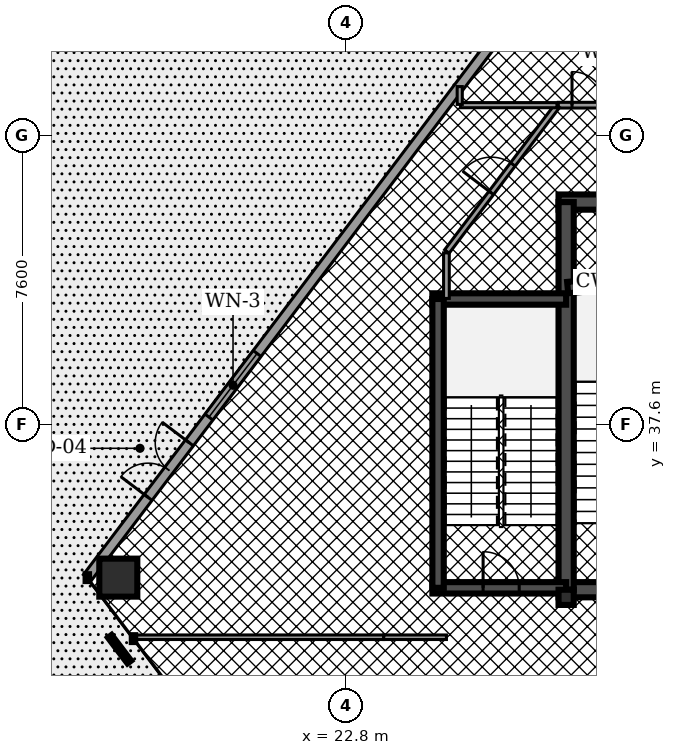
"""IFC4 building model, lengths in metres.
Left out: names, types, materials, properties, quantities, classifications, styles, units other than length and angle.
Written with IfcOpenShell. Run it as: python <this file> out.ifc"""

import sys

from ifc_helpers import new_model, si_unit, direction, frame, frame_2d, origin, origin_2d, place, context, subcontext, project, spatial, rectangle, hollow_rectangle, extrude, element, fill, save


model = new_model("IFC4")
c1 = context("Model", 3, precision=1e-05, world=origin(), true_north=direction((0.0, 1.0)))
c2 = subcontext(c1, "Body", "Model", "MODEL_VIEW")
j1 = project(units=[si_unit("LENGTHUNIT", "METRE"), si_unit("PLANEANGLEUNIT", "RADIAN")], contexts=[c1])
p1 = place(None, origin())
s1 = spatial("IfcSite", under=j1, at=p1, CompositionType="ELEMENT")
p2 = place(p1, origin())
s2 = spatial("IfcBuilding", under=s1, at=p2, CompositionType="ELEMENT")
p3 = place(p2, frame((0.0, 0.0, 22.78)))
s3 = spatial("IfcBuildingStorey", under=s2, at=p3, CompositionType="ELEMENT", Elevation=22.78)
p4 = place(p3, frame((28.4, 43.45, 0.0), z_axis=(0.0, 0.0, 1.0), x_axis=(1.0, 0.0, 0.0)))
e1 = element("IfcWall", 1, at=p4, inside=s3, PredefinedType="SHEAR", context=c2, shape_type="SweptSolid", body=[
    extrude(rectangle(XDim=20.06, YDim=0.4, at=frame_2d((10.03, 0.0))), origin(), (0.0, 0.0, 1.0), 4.5),
])
p5 = place(p3, frame((28.4, 33.25, 0.0), z_axis=(0.0, 0.0, 1.0), x_axis=(1.0, 0.0, 0.0)))
e2 = element("IfcWall", 2, at=p5, inside=s3, PredefinedType="SHEAR", context=c2, shape_type="SweptSolid", body=[
    extrude(rectangle(XDim=20.06, YDim=0.4, at=frame_2d((10.03, 0.0))), origin(), (0.0, 0.0, 1.0), 4.5),
])
p6 = place(p5, frame((4.03, 0.0, 0.0)))
e3 = element("IfcOpeningElement", 3, at=p6, cuts=e2, PredefinedType="OPENING", context=c2, shape_type="SweptSolid", body=[
    extrude(rectangle(XDim=1.1, YDim=2.15, at=frame_2d((0.55, 1.075))), frame((0.0, 0.21, 0.0), z_axis=(0.0, -1.0, 0.0), x_axis=(1.0, 0.0, 0.0)), (0.0, 0.0, 1.0), 0.42),
])
p7 = place(p5, frame((14.87, 0.0, 0.0)))
e4 = element("IfcOpeningElement", 4, at=p7, cuts=e2, PredefinedType="OPENING", context=c2, shape_type="SweptSolid", body=[
    extrude(rectangle(XDim=1.1, YDim=2.15, at=frame_2d((0.55, 1.075))), frame((0.0, 0.21, 0.0), z_axis=(0.0, -1.0, 0.0), x_axis=(1.0, 0.0, 0.0)), (0.0, 0.0, 1.0), 0.42),
])
p8 = place(p5, frame((1.31, 0.0, 0.0)))
e5 = element("IfcOpeningElement", 5, at=p8, cuts=e2, PredefinedType="OPENING", context=c2, shape_type="SweptSolid", body=[
    extrude(rectangle(XDim=1.1, YDim=2.2, at=frame_2d((0.55, 1.1))), frame((0.0, 0.21, 0.0), z_axis=(0.0, -1.0, 0.0), x_axis=(1.0, 0.0, 0.0)), (0.0, 0.0, 1.0), 0.42),
])
p9 = place(p5, frame((9.44, 0.0, 0.0)))
e6 = element("IfcOpeningElement", 6, at=p9, cuts=e2, PredefinedType="OPENING", context=c2, shape_type="SweptSolid", body=[
    extrude(rectangle(XDim=1.12, YDim=2.05, at=frame_2d((0.56, 1.025))), frame((0.0, 0.21, 0.0), z_axis=(0.0, -1.0, 0.0), x_axis=(1.0, 0.0, 0.0)), (0.0, 0.0, 1.0), 0.42),
])
p10 = place(p5, frame((17.65, 0.0, 0.0)))
e7 = element("IfcOpeningElement", 7, at=p10, cuts=e2, PredefinedType="OPENING", context=c2, shape_type="SweptSolid", body=[
    extrude(rectangle(XDim=1.1, YDim=2.2, at=frame_2d((0.55, 1.1))), frame((0.0, 0.21, 0.0), z_axis=(0.0, -1.0, 0.0), x_axis=(1.0, 0.0, 0.0)), (0.0, 0.0, 1.0), 0.42),
])
p11 = place(p3, frame((28.6, 33.25, 0.0), z_axis=(0.0, 0.0, 1.0), x_axis=(0.0, 1.0, 0.0)))
e8 = element("IfcWall", 8, at=p11, inside=s3, PredefinedType="SHEAR", context=c2, shape_type="SweptSolid", body=[
    extrude(rectangle(XDim=10.2, YDim=0.4, at=frame_2d((5.1, 0.0))), origin(), (0.0, 0.0, 1.0), 4.5),
])
p12 = place(p3, frame((28.64, 41.2, 0.0), z_axis=(0.0, 0.0, 1.0), x_axis=(0.995687118776, 0.092774789157, 0.0)))
e9 = element("IfcWall", 9, at=p12, inside=s3, PredefinedType="SHEAR", context=c2, shape_type="SweptSolid", body=[
    extrude(rectangle(XDim=3.234, YDim=0.3, at=frame_2d((1.617, 0.0))), origin(), (0.0, 0.0, 1.0), 4.5),
])
p13 = place(p3, frame((25.08, 40.9, 0.0), z_axis=(0.0, 0.0, 1.0), x_axis=(1.0, 0.0, 0.0)))
e10 = element("IfcWall", 10, at=p13, inside=s3, PredefinedType="SHEAR", context=c2, shape_type="SweptSolid", body=[
    extrude(rectangle(XDim=3.52, YDim=0.3, at=frame_2d((1.76, 0.0))), origin(), (0.0, 0.0, 1.0), 4.5),
])
p14 = place(p3, frame((25.08, 33.3, 0.0), z_axis=(0.0, 0.0, 1.0), x_axis=(1.0, 0.0, 0.0)))
e11 = element("IfcWall", 11, at=p14, inside=s3, PredefinedType="SHEAR", context=c2, shape_type="SweptSolid", body=[
    extrude(rectangle(XDim=3.52, YDim=0.3, at=frame_2d((1.76, 0.0))), origin(), (0.0, 0.0, 1.0), 4.5),
])
p15 = place(p14, frame((1.335, 0.0, 0.0)))
e12 = element("IfcOpeningElement", 12, at=p15, cuts=e11, PredefinedType="OPENING", context=c2, shape_type="SweptSolid", body=[
    extrude(rectangle(XDim=0.95, YDim=2.2, at=frame_2d((0.475, 1.1))), frame((0.0, 0.16, 0.0), z_axis=(0.0, -1.0, 0.0), x_axis=(1.0, 0.0, 0.0)), (0.0, 0.0, 1.0), 0.32),
])
p16 = place(p3, frame((25.23, 33.3, 0.0), z_axis=(0.0, 0.0, 1.0), x_axis=(0.0, 1.0, 0.0)))
e13 = element("IfcWall", 13, at=p16, inside=s3, PredefinedType="SHEAR", context=c2, shape_type="SweptSolid", body=[
    extrude(rectangle(XDim=7.6, YDim=0.3, at=frame_2d((3.8, 0.0))), origin(), (0.0, 0.0, 1.0), 4.5),
])
p17 = place(p3, frame((16.815, 33.568, 0.0), z_axis=(-0.010463457078, 0.03626970355, 0.999287258335), x_axis=(-0.960816235785, -0.277186148739, 0.0)))
e14 = element("IfcColumn", 14, at=p17, inside=s3, PredefinedType="COLUMN", context=c2, shape_type="SweptSolid", body=[
    extrude(hollow_rectangle(XDim=1.0, YDim=1.0, WallThickness=0.05, at=origin_2d()), origin(), (0.0, 0.0, 1.0), 4.503),
])
p18 = place(p3, frame((28.6, 33.05, 0.0), z_axis=(0.0, 0.0, 1.0), x_axis=(1.0, 0.0, 0.0)))
e15 = element("IfcColumn", 15, at=p18, inside=s3, PredefinedType="PILASTER", context=c2, shape_type="SweptSolid", body=[
    extrude(hollow_rectangle(XDim=0.4, YDim=0.4, WallThickness=0.02, at=origin_2d()), origin(), (0.0, 0.0, 1.0), 4.5),
])
p19 = place(p3, frame((16.0, 33.568, 0.0), z_axis=(0.0, 0.0, 1.0), x_axis=(0.603864446157, 0.797087028289, 0.0)))
e16 = element("IfcWall", 16, at=p19, inside=s3, PredefinedType="STANDARD", context=c2, shape_type="SweptSolid", body=[
    extrude(rectangle(XDim=20.866, YDim=0.26, at=frame_2d((10.433, 0.0))), origin(), (0.0, 0.0, 1.0), 3.65),
])
p20 = place(p19, frame((2.65, 0.0, 0.0)))
e17 = element("IfcOpeningElement", 17, at=p20, cuts=e16, PredefinedType="OPENING", context=c2, shape_type="SweptSolid", body=[
    extrude(rectangle(XDim=1.8, YDim=2.2, at=frame_2d((0.9, 1.1))), frame((0.0, 0.14, 0.0), z_axis=(0.0, -1.0, 0.0), x_axis=(1.0, 0.0, 0.0)), (0.0, 0.0, 1.0), 0.28),
])
p21 = place(p19, frame((5.3, 0.0, 0.75)))
e18 = element("IfcOpeningElement", 18, at=p21, cuts=e16, PredefinedType="OPENING", context=c2, shape_type="SweptSolid", body=[
    extrude(rectangle(XDim=2.1, YDim=2.2, at=frame_2d((1.05, 1.1))), frame((0.0, 0.14, 0.0), z_axis=(0.0, -1.0, 0.0), x_axis=(1.0, 0.0, 0.0)), (0.0, 0.0, 1.0), 0.28),
])
p22 = place(p3, frame((28.394, 46.0, 0.0), z_axis=(0.0, 0.0, 1.0), x_axis=(1.0, 0.0, 0.0)))
e19 = element("IfcWall", 19, at=p22, inside=s3, PredefinedType="PARTITIONING", context=c2, shape_type="SweptSolid", body=[
    extrude(rectangle(XDim=1.601, YDim=0.15, at=frame_2d((0.801, 0.0))), origin(), (0.0, 0.0, 1.0), 3.457),
])
p23 = place(p22, frame((0.361, 0.0, 0.0)))
e20 = element("IfcOpeningElement", 20, at=p23, cuts=e19, PredefinedType="OPENING", context=c2, shape_type="SweptSolid", body=[
    extrude(rectangle(XDim=0.88, YDim=2.05, at=frame_2d((0.44, 1.025))), frame((0.0, 0.085, 0.0), z_axis=(0.0, -1.0, 0.0), x_axis=(1.0, 0.0, 0.0)), (0.0, 0.0, 1.0), 0.17),
])
p24 = place(p3, frame((25.45, 40.915, 0.0), z_axis=(0.0, 0.0, 1.0), x_axis=(0.0, 1.0, 0.0)))
e21 = element("IfcWall", 21, at=p24, inside=s3, PredefinedType="PARTITIONING", context=c2, shape_type="SweptSolid", body=[
    extrude(rectangle(XDim=1.199, YDim=0.15, at=frame_2d((0.599, 0.0))), origin(), (0.0, 0.0, 1.0), 3.457),
])
p25 = place(p3, frame((25.462, 42.15, 0.0), z_axis=(0.0, 0.0, 1.0), x_axis=(0.60380980605, 0.797128420091, 0.0)))
e22 = element("IfcWall", 22, at=p25, inside=s3, PredefinedType="PARTITIONING", context=c2, shape_type="SweptSolid", body=[
    extrude(rectangle(XDim=4.81, YDim=0.15, at=frame_2d((2.405, 0.0))), origin(), (0.0, 0.0, 1.0), 3.457),
])
p26 = place(p25, frame((1.935, 0.0, 0.0)))
e23 = element("IfcOpeningElement", 23, at=p26, cuts=e22, PredefinedType="OPENING", context=c2, shape_type="SweptSolid", body=[
    extrude(rectangle(XDim=0.94, YDim=2.05, at=frame_2d((0.47, 1.025))), frame((0.0, 0.085, 0.0), z_axis=(0.0, -1.0, 0.0), x_axis=(1.0, 0.0, 0.0)), (0.0, 0.0, 1.0), 0.17),
])
p27 = place(p3, frame((25.82, 46.0, 0.0), z_axis=(0.0, 0.0, 1.0), x_axis=(1.0, 0.0, 0.0)))
e24 = element("IfcWall", 24, at=p27, inside=s3, PredefinedType="PARTITIONING", context=c2, shape_type="SweptSolid", body=[
    extrude(rectangle(XDim=2.539, YDim=0.135, at=frame_2d((1.27, 0.0))), origin(), (0.0, 0.0, 1.0), 3.457),
])
p28 = place(p3, frame((25.8, 46.02, 0.0), z_axis=(0.0, 0.0, 1.0), x_axis=(0.0, 1.0, 0.0)))
e25 = element("IfcWall", 25, at=p28, inside=s3, PredefinedType="PARTITIONING", context=c2, shape_type="SweptSolid", body=[
    extrude(rectangle(XDim=0.469, YDim=0.135, at=frame_2d((0.234, 0.0))), origin(), (0.0, 0.0, 1.0), 3.457),
])
p29 = place(p3, frame((17.203, 32.0, 0.0), z_axis=(0.0, 0.0, 1.0), x_axis=(1.0, 0.0, 0.0)))
e26 = element("IfcWall", 26, at=p29, inside=s3, PredefinedType="PARTITIONING", context=c2, shape_type="SweptSolid", body=[
    extrude(rectangle(XDim=6.597, YDim=0.12, at=frame_2d((3.299, 0.0))), origin(), (0.0, 0.0, 1.0), 3.457),
])
p30 = place(p3, frame((23.8, 32.0, 0.0), z_axis=(0.0, 0.0, 1.0), x_axis=(1.0, 0.0, 0.0)))
e27 = element("IfcWall", 27, at=p30, inside=s3, PredefinedType="PARTITIONING", context=c2, shape_type="SweptSolid", body=[
    extrude(rectangle(XDim=1.65, YDim=0.12, at=frame_2d((0.825, 0.0))), origin(), (0.0, 0.0, 1.0), 3.457),
])
p31 = place(p20, origin())
e28 = element("IfcDoor", 28, at=p31, inside=s3, OperationType="DOUBLE_DOOR_SINGLE_SWING", PredefinedType="DOOR", context=c2, shape_type="SweptSolid", body=[
    extrude(rectangle(XDim=1.8, YDim=2.2, at=frame_2d((0.9, 1.1))), frame((0.0, 0.025, 0.0), z_axis=(0.0, -1.0, 0.0), x_axis=(1.0, 0.0, 0.0)), (0.0, 0.0, 1.0), 0.05),
])
fill(e17, e28)
p32 = place(p21, origin())
e29 = element("IfcWindow", 29, at=p32, inside=s3, PartitioningType="SINGLE_PANEL", PredefinedType="WINDOW", context=c2, shape_type="SweptSolid", body=[
    extrude(rectangle(XDim=2.1, YDim=2.2, at=frame_2d((1.05, 1.1))), frame((0.0, 0.03, 0.0), z_axis=(0.0, -1.0, 0.0), x_axis=(1.0, 0.0, 0.0)), (0.0, 0.0, 1.0), 0.06),
])
fill(e18, e29)
p33 = place(p15, origin())
e30 = element("IfcDoor", 30, at=p33, inside=s3, OperationType="SINGLE_SWING_LEFT", PredefinedType="DOOR", context=c2, shape_type="SweptSolid", body=[
    extrude(rectangle(XDim=0.95, YDim=2.2, at=frame_2d((0.475, 1.1))), frame((0.0, 0.025, 0.0), z_axis=(0.0, -1.0, 0.0), x_axis=(1.0, 0.0, 0.0)), (0.0, 0.0, 1.0), 0.05),
])
fill(e12, e30)
p34 = place(p23, origin())
e31 = element("IfcDoor", 31, at=p34, inside=s3, OperationType="SINGLE_SWING_LEFT", PredefinedType="DOOR", context=c2, shape_type="SweptSolid", body=[
    extrude(rectangle(XDim=0.88, YDim=2.05, at=frame_2d((0.44, 1.025))), frame((0.0, 0.025, 0.0), z_axis=(0.0, -1.0, 0.0), x_axis=(1.0, 0.0, 0.0)), (0.0, 0.0, 1.0), 0.05),
])
fill(e20, e31)
p35 = place(p26, origin())
e32 = element("IfcDoor", 32, at=p35, inside=s3, OperationType="SINGLE_SWING_LEFT", PredefinedType="DOOR", context=c2, shape_type="SweptSolid", body=[
    extrude(rectangle(XDim=0.94, YDim=2.05, at=frame_2d((0.47, 1.025))), frame((0.0, 0.025, 0.0), z_axis=(0.0, -1.0, 0.0), x_axis=(1.0, 0.0, 0.0)), (0.0, 0.0, 1.0), 0.05),
])
fill(e23, e32)
save(model, sys.argv[1])
